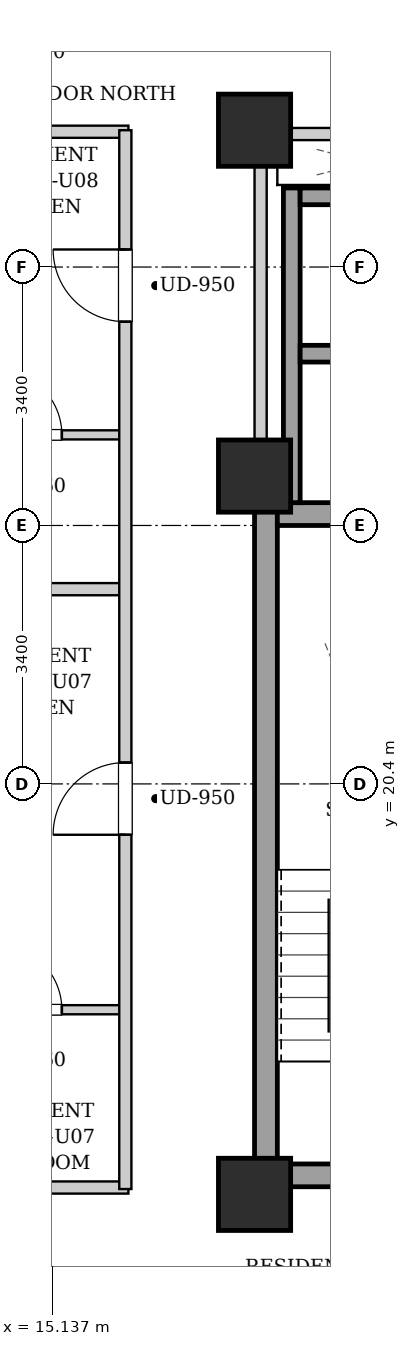
"""IFC4 building model, lengths in metres.
Left out: names, types, materials, properties, quantities, classifications, styles, units other than length and angle.
Written with IfcOpenShell. Run it as: python <this file> out.ifc"""

import sys

from ifc_helpers import new_model, si_unit, direction, frame, frame_2d, origin, origin_2d, place, context, subcontext, project, spatial, rectangle, extrude, element, fill, save


model = new_model("IFC4")
c1 = context("Model", 3, precision=1e-05, world=origin(), true_north=direction((0.0, 1.0)))
c2 = subcontext(c1, "Body", "Model", "MODEL_VIEW")
j1 = project(units=[si_unit("LENGTHUNIT", "METRE"), si_unit("PLANEANGLEUNIT", "RADIAN")], contexts=[c1])
p1 = place(None, origin())
s1 = spatial("IfcSite", under=j1, at=p1, CompositionType="ELEMENT")
p2 = place(p1, origin())
s2 = spatial("IfcBuilding", under=s1, at=p2, CompositionType="ELEMENT")
p3 = place(p2, frame((0.0, 0.0, 163.4)))
s3 = spatial("IfcBuildingStorey", under=s2, at=p3, CompositionType="ELEMENT", Elevation=163.4)
for number, where, z_axis, x_axis in (
    (1, (17.8, 15.0, 0.0), (0.0, 0.0, 1.0), (1.0, 0.0, 0.0)),
    (2, (17.8, 29.0, 0.0), (0.0, 0.0, 1.0), (1.0, 0.0, 0.0)),
    (3, (17.8, 24.45, 0.0), (0.0, 0.0, 1.0), (1.0, 0.0, 0.0)),
):
    element("IfcColumn", number, at=place(p3, frame(where, z_axis=z_axis, x_axis=x_axis)), inside=s3, PredefinedType="COLUMN", context=c2, shape_type="SweptSolid", body=[
        extrude(rectangle(XDim=0.95, YDim=0.95, at=origin_2d()), origin(), (0.0, 0.0, 1.0), 3.25),
    ])
p4 = place(p3, frame((17.95, 15.1, 0.0), z_axis=(0.0, 0.0, 1.0), x_axis=(0.0, 1.0, 0.0)))
e4 = element("IfcWall", 4, at=p4, inside=s3, PredefinedType="SHEAR", context=c2, shape_type="SweptSolid", body=[
    extrude(rectangle(XDim=9.0, YDim=0.3, at=frame_2d((4.5, 0.0))), origin(), (0.0, 0.0, 1.0), 2.99),
])
p5 = place(p3, frame((18.1, 23.95, 0.0), z_axis=(0.0, 0.0, 1.0), x_axis=(1.0, 0.0, 0.0)))
e5 = element("IfcWall", 5, at=p5, inside=s3, PredefinedType="SHEAR", context=c2, shape_type="SweptSolid", body=[
    extrude(rectangle(XDim=2.85, YDim=0.3, at=frame_2d((1.425, 0.0))), origin(), (0.0, 0.0, 1.0), 2.99),
])
p6 = place(p3, frame((18.1, 15.25, 0.0), z_axis=(0.0, 0.0, 1.0), x_axis=(1.0, 0.0, 0.0)))
e6 = element("IfcWall", 6, at=p6, inside=s3, PredefinedType="SHEAR", context=c2, shape_type="SweptSolid", body=[
    extrude(rectangle(XDim=2.85, YDim=0.3, at=frame_2d((1.425, 0.0))), origin(), (0.0, 0.0, 1.0), 2.99),
])
p7 = place(p6, frame((0.86, 0.0, 0.0)))
e7 = element("IfcOpeningElement", 7, at=p7, cuts=e6, PredefinedType="OPENING", context=c2, shape_type="SweptSolid", body=[
    extrude(rectangle(XDim=1.1, YDim=2.05, at=frame_2d((0.55, 1.025))), frame((0.0, 0.16, 0.0), z_axis=(0.0, -1.0, 0.0), x_axis=(1.0, 0.0, 0.0)), (0.0, 0.0, 1.0), 0.32),
])
p8 = place(p3, frame((18.29, 24.1, 0.0), z_axis=(0.0, 0.0, 1.0), x_axis=(0.0, 1.0, 0.0)))
e8 = element("IfcWall", 8, at=p8, inside=s3, PredefinedType="SHEAR", context=c2, shape_type="SweptSolid", body=[
    extrude(rectangle(XDim=4.14, YDim=0.22, at=frame_2d((2.07, 0.0))), origin(), (0.0, 0.0, 1.0), 2.99),
])
for number, where, z_axis, x_axis in (
    (9, (18.4, 26.06, 0.0), (0.0, 0.0, 1.0), (1.0, 0.0, 0.0)),
    (10, (18.4, 28.13, 0.0), (0.0, 0.0, 1.0), (1.0, 0.0, 0.0)),
):
    element("IfcWall", number, at=place(p3, frame(where, z_axis=z_axis, x_axis=x_axis)), inside=s3, PredefinedType="SHEAR", context=c2, shape_type="SweptSolid", body=[
        extrude(rectangle(XDim=1.9, YDim=0.22, at=frame_2d((0.95, 0.0))), origin(), (0.0, 0.0, 1.0), 2.99),
    ])
p9 = place(p3, frame((17.88, 24.12, 0.0), z_axis=(0.0, 0.0, 1.0), x_axis=(0.0, 1.0, 0.0)))
e11 = element("IfcWall", 11, at=p9, inside=s3, PredefinedType="PARTITIONING", context=c2, shape_type="SweptSolid", body=[
    extrude(rectangle(XDim=4.76, YDim=0.16, at=frame_2d((2.38, 0.0))), origin(), (0.0, 0.0, 1.0), 2.99),
])
p10 = place(p3, frame((17.96, 28.95, 0.0), z_axis=(0.0, 0.0, 1.0), x_axis=(1.0, 0.0, 0.0)))
e12 = element("IfcWall", 12, at=p10, inside=s3, PredefinedType="PARTITIONING", context=c2, shape_type="SweptSolid", body=[
    extrude(rectangle(XDim=4.29, YDim=0.16, at=frame_2d((2.145, 0.0))), origin(), (0.0, 0.0, 1.0), 2.442),
])
p11 = place(p10, frame((1.695, 0.0, 0.0)))
e13 = element("IfcOpeningElement", 13, at=p11, cuts=e12, PredefinedType="OPENING", context=c2, shape_type="SweptSolid", body=[
    extrude(rectangle(XDim=0.86, YDim=2.05, at=frame_2d((0.43, 1.025))), frame((0.0, 0.09, 0.0), z_axis=(0.0, -1.0, 0.0), x_axis=(1.0, 0.0, 0.0)), (0.0, 0.0, 1.0), 0.18),
])
for number, where, z_axis, x_axis in (
    (14, (7.78, 15.09, 0.0), (0.0, 0.0, 1.0), (1.0, 0.0, 0.0)),
    (15, (7.78, 28.98, 0.0), (0.0, 0.0, 1.0), (1.0, 0.0, 0.0)),
):
    element("IfcWall", number, at=place(p3, frame(where, z_axis=z_axis, x_axis=x_axis)), inside=s3, PredefinedType="PARTITIONING", context=c2, shape_type="SweptSolid", body=[
        extrude(rectangle(XDim=8.36, YDim=0.16, at=frame_2d((4.18, 0.0))), origin(), (0.0, 0.0, 1.0), 2.442),
    ])
p12 = place(p3, frame((7.78, 22.962, 0.0), z_axis=(0.0, 0.0, 1.0), x_axis=(1.0, 0.0, 0.0)))
e16 = element("IfcWall", 16, at=p12, inside=s3, PredefinedType="PARTITIONING", context=c2, shape_type="SweptSolid", body=[
    extrude(rectangle(XDim=8.28, YDim=0.16, at=frame_2d((4.14, 0.0))), origin(), (0.0, 0.0, 1.0), 2.99),
])
p13 = place(p3, frame((13.61, 17.429, 0.0), z_axis=(0.0, 0.0, 1.0), x_axis=(1.0, 0.0, 0.0)))
e17 = element("IfcWall", 17, at=p13, inside=s3, PredefinedType="PARTITIONING", context=c2, shape_type="SweptSolid", body=[
    extrude(rectangle(XDim=2.45, YDim=0.12, at=frame_2d((1.225, 0.0))), origin(), (0.0, 0.0, 1.0), 2.99),
])
p14 = place(p13, frame((0.795, 0.0, 0.0)))
e18 = element("IfcOpeningElement", 18, at=p14, cuts=e17, PredefinedType="OPENING", context=c2, shape_type="SweptSolid", body=[
    extrude(rectangle(XDim=0.86, YDim=2.05, at=frame_2d((0.43, 1.025))), frame((0.0, 0.07, 0.0), z_axis=(0.0, -1.0, 0.0), x_axis=(1.0, 0.0, 0.0)), (0.0, 0.0, 1.0), 0.14),
])
p15 = place(p3, frame((13.61, 24.992, 0.0), z_axis=(0.0, 0.0, 1.0), x_axis=(1.0, 0.0, 0.0)))
e19 = element("IfcWall", 19, at=p15, inside=s3, PredefinedType="PARTITIONING", context=c2, shape_type="SweptSolid", body=[
    extrude(rectangle(XDim=2.45, YDim=0.12, at=frame_2d((1.225, 0.0))), origin(), (0.0, 0.0, 1.0), 2.99),
])
p16 = place(p15, frame((0.795, 0.0, 0.0)))
e20 = element("IfcOpeningElement", 20, at=p16, cuts=e19, PredefinedType="OPENING", context=c2, shape_type="SweptSolid", body=[
    extrude(rectangle(XDim=0.86, YDim=2.05, at=frame_2d((0.43, 1.025))), frame((0.0, 0.07, 0.0), z_axis=(0.0, -1.0, 0.0), x_axis=(1.0, 0.0, 0.0)), (0.0, 0.0, 1.0), 0.14),
])
p17 = place(p3, frame((16.1, 15.07, 0.0), z_axis=(0.0, 0.0, 1.0), x_axis=(0.0, 1.0, 0.0)))
e21 = element("IfcWall", 21, at=p17, inside=s3, PredefinedType="PARTITIONING", context=c2, shape_type="SweptSolid", body=[
    extrude(rectangle(XDim=13.93, YDim=0.16, at=frame_2d((6.965, 0.0))), origin(), (0.0, 0.0, 1.0), 2.99),
])
p18 = place(p17, frame((4.661, 0.0, 0.0)))
e22 = element("IfcOpeningElement", 22, at=p18, cuts=e21, PredefinedType="OPENING", context=c2, shape_type="SweptSolid", body=[
    extrude(rectangle(XDim=0.95, YDim=2.1, at=frame_2d((0.475, 1.05))), frame((0.0, 0.09, 0.0), z_axis=(0.0, -1.0, 0.0), x_axis=(1.0, 0.0, 0.0)), (0.0, 0.0, 1.0), 0.18),
])
p19 = place(p17, frame((11.411, 0.0, 0.0)))
e23 = element("IfcOpeningElement", 23, at=p19, cuts=e21, PredefinedType="OPENING", context=c2, shape_type="SweptSolid", body=[
    extrude(rectangle(XDim=0.95, YDim=2.1, at=frame_2d((0.475, 1.05))), frame((0.0, 0.09, 0.0), z_axis=(0.0, -1.0, 0.0), x_axis=(1.0, 0.0, 0.0)), (0.0, 0.0, 1.0), 0.18),
])
p20 = place(p14, origin())
e24 = element("IfcDoor", 24, at=p20, inside=s3, OperationType="SINGLE_SWING_LEFT", PredefinedType="DOOR", context=c2, shape_type="SweptSolid", body=[
    extrude(rectangle(XDim=0.86, YDim=2.05, at=frame_2d((0.43, 1.025))), frame((0.0, 0.025, 0.0), z_axis=(0.0, -1.0, 0.0), x_axis=(1.0, 0.0, 0.0)), (0.0, 0.0, 1.0), 0.05),
])
fill(e18, e24)
p21 = place(p16, origin())
e25 = element("IfcDoor", 25, at=p21, inside=s3, OperationType="SINGLE_SWING_LEFT", PredefinedType="DOOR", context=c2, shape_type="SweptSolid", body=[
    extrude(rectangle(XDim=0.86, YDim=2.05, at=frame_2d((0.43, 1.025))), frame((0.0, 0.025, 0.0), z_axis=(0.0, -1.0, 0.0), x_axis=(1.0, 0.0, 0.0)), (0.0, 0.0, 1.0), 0.05),
])
fill(e20, e25)
p22 = place(p18, origin())
e26 = element("IfcDoor", 26, at=p22, inside=s3, OperationType="SINGLE_SWING_LEFT", PredefinedType="DOOR", context=c2, shape_type="SweptSolid", body=[
    extrude(rectangle(XDim=0.95, YDim=2.1, at=frame_2d((0.475, 1.05))), frame((0.0, 0.025, 0.0), z_axis=(0.0, -1.0, 0.0), x_axis=(1.0, 0.0, 0.0)), (0.0, 0.0, 1.0), 0.05),
])
fill(e22, e26)
p23 = place(p19, origin())
e27 = element("IfcDoor", 27, at=p23, inside=s3, OperationType="SINGLE_SWING_RIGHT", PredefinedType="DOOR", context=c2, shape_type="SweptSolid", body=[
    extrude(rectangle(XDim=0.95, YDim=2.1, at=frame_2d((0.475, 1.05))), frame((0.0, 0.025, 0.0), z_axis=(0.0, -1.0, 0.0), x_axis=(1.0, 0.0, 0.0)), (0.0, 0.0, 1.0), 0.05),
])
fill(e23, e27)
save(model, sys.argv[1])
